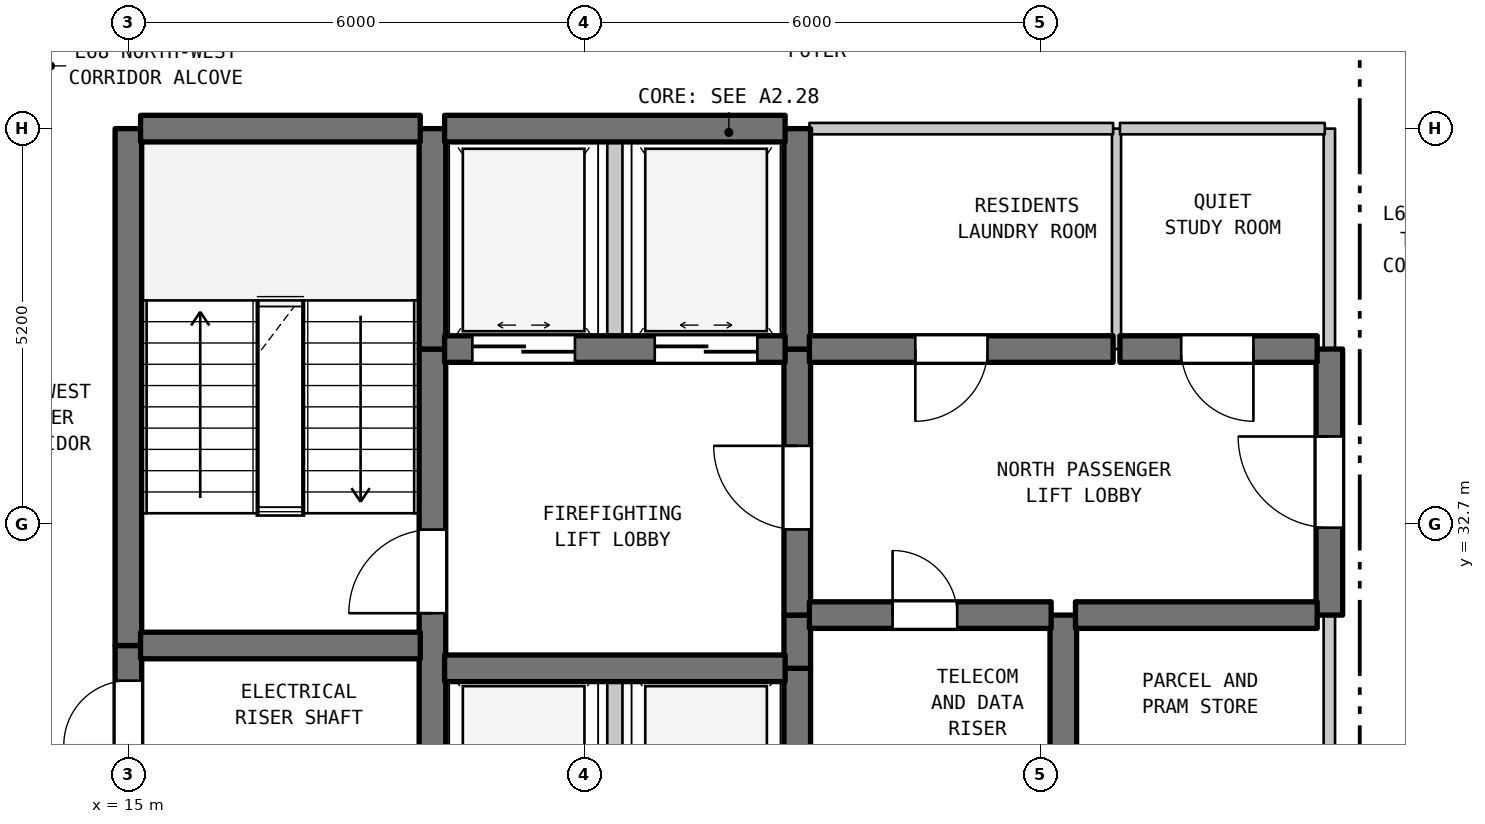
"""IFC4 building model, lengths in metres.
Left out: names, types, materials, properties, quantities, classifications, styles, units other than length and angle.
Written with IfcOpenShell. Run it as: python <this file> out.ifc"""

import sys

from ifc_helpers import new_model, si_unit, direction, frame, frame_2d, origin, place, context, subcontext, project, spatial, rectangle, extrude, element, fill, save


model = new_model("IFC4")
c1 = context("Model", 3, precision=1e-05, world=origin(), true_north=direction((0.0, 1.0)))
c2 = subcontext(c1, "Body", "Model", "MODEL_VIEW")
j1 = project(units=[si_unit("LENGTHUNIT", "METRE"), si_unit("PLANEANGLEUNIT", "RADIAN")], contexts=[c1])
p1 = place(None, origin())
s1 = spatial("IfcSite", under=j1, at=p1, CompositionType="ELEMENT")
p2 = place(p1, origin())
s2 = spatial("IfcBuilding", under=s1, at=p2, CompositionType="ELEMENT")
p3 = place(p2, frame((0.0, 0.0, 273.2)))
s3 = spatial("IfcBuildingStorey", under=s2, at=p3, CompositionType="ELEMENT", Elevation=273.2)
p4 = place(p3, frame((15.0, 29.5, 0.0), z_axis=(0.0, 0.0, 1.0), x_axis=(0.0, 1.0, 0.0)))
e1 = element("IfcWall", 1, at=p4, inside=s3, PredefinedType="SHEAR", context=c2, shape_type="SweptSolid", body=[
    extrude(rectangle(XDim=1.6, YDim=0.35, at=frame_2d((0.8, 0.0))), origin(), (0.0, 0.0, 1.0), 3.39),
])
p5 = place(p4, frame((0.287, 0.0, 0.0)))
e2 = element("IfcOpeningElement", 2, at=p5, cuts=e1, PredefinedType="OPENING", context=c2, shape_type="SweptSolid", body=[
    extrude(rectangle(XDim=0.85, YDim=2.1, at=frame_2d((0.425, 1.05))), frame((0.0, 0.185, 0.0), z_axis=(0.0, -1.0, 0.0), x_axis=(1.0, 0.0, 0.0)), (0.0, 0.0, 1.0), 0.37),
])
p6 = place(p3, frame((15.0, 31.1, 0.0), z_axis=(0.0, 0.0, 1.0), x_axis=(0.0, 1.0, 0.0)))
e3 = element("IfcWall", 3, at=p6, inside=s3, PredefinedType="SHEAR", context=c2, shape_type="SweptSolid", body=[
    extrude(rectangle(XDim=6.8, YDim=0.35, at=frame_2d((3.4, 0.0))), origin(), (0.0, 0.0, 1.0), 3.39),
])
p7 = place(p3, frame((19.0, 29.5, 0.0), z_axis=(0.0, 0.0, 1.0), x_axis=(0.0, 1.0, 0.0)))
e4 = element("IfcWall", 4, at=p7, inside=s3, PredefinedType="SHEAR", context=c2, shape_type="SweptSolid", body=[
    extrude(rectangle(XDim=5.5, YDim=0.35, at=frame_2d((2.75, 0.0))), origin(), (0.0, 0.0, 1.0), 3.39),
])
p8 = place(p7, frame((2.025, 0.0, 0.0)))
e5 = element("IfcOpeningElement", 5, at=p8, cuts=e4, PredefinedType="OPENING", context=c2, shape_type="SweptSolid", body=[
    extrude(rectangle(XDim=1.1, YDim=2.15, at=frame_2d((0.55, 1.075))), frame((0.0, 0.185, 0.0), z_axis=(0.0, -1.0, 0.0), x_axis=(1.0, 0.0, 0.0)), (0.0, 0.0, 1.0), 0.37),
])
p9 = place(p3, frame((19.0, 35.0, 0.0), z_axis=(0.0, 0.0, 1.0), x_axis=(0.0, 1.0, 0.0)))
e6 = element("IfcWall", 6, at=p9, inside=s3, PredefinedType="SHEAR", context=c2, shape_type="SweptSolid", body=[
    extrude(rectangle(XDim=2.9, YDim=0.35, at=frame_2d((1.45, 0.0))), origin(), (0.0, 0.0, 1.0), 3.39),
])
p10 = place(p3, frame((21.4, 28.2, 0.0), z_axis=(0.0, 0.0, 1.0), x_axis=(0.0, 1.0, 0.0)))
e7 = element("IfcWall", 7, at=p10, inside=s3, PredefinedType="STANDARD", context=c2, shape_type="SweptSolid", body=[
    extrude(rectangle(XDim=2.6, YDim=0.2, at=frame_2d((1.3, 0.0))), origin(), (0.0, 0.0, 1.0), 3.39),
])
p11 = place(p3, frame((21.4, 35.0, 0.0), z_axis=(0.0, 0.0, 1.0), x_axis=(0.0, 1.0, 0.0)))
e8 = element("IfcWall", 8, at=p11, inside=s3, PredefinedType="STANDARD", context=c2, shape_type="SweptSolid", body=[
    extrude(rectangle(XDim=2.9, YDim=0.2, at=frame_2d((1.45, 0.0))), origin(), (0.0, 0.0, 1.0), 3.39),
])
p12 = place(p3, frame((23.8, 28.2, 0.0), z_axis=(0.0, 0.0, 1.0), x_axis=(0.0, 1.0, 0.0)))
e9 = element("IfcWall", 9, at=p12, inside=s3, PredefinedType="SHEAR", context=c2, shape_type="SweptSolid", body=[
    extrude(rectangle(XDim=2.6, YDim=0.35, at=frame_2d((1.3, 0.0))), origin(), (0.0, 0.0, 1.0), 3.39),
])
p13 = place(p3, frame((23.8, 30.8, 0.0), z_axis=(0.0, 0.0, 1.0), x_axis=(0.0, 1.0, 0.0)))
e10 = element("IfcWall", 10, at=p13, inside=s3, PredefinedType="SHEAR", context=c2, shape_type="SweptSolid", body=[
    extrude(rectangle(XDim=0.7, YDim=0.35, at=frame_2d((0.35, 0.0))), origin(), (0.0, 0.0, 1.0), 3.39),
])
p14 = place(p3, frame((23.8, 31.5, 0.0), z_axis=(0.0, 0.0, 1.0), x_axis=(0.0, 1.0, 0.0)))
e11 = element("IfcWall", 11, at=p14, inside=s3, PredefinedType="SHEAR", context=c2, shape_type="SweptSolid", body=[
    extrude(rectangle(XDim=3.5, YDim=0.35, at=frame_2d((1.75, 0.0))), origin(), (0.0, 0.0, 1.0), 3.39),
])
p15 = place(p14, frame((1.127, 0.0, 0.0)))
e12 = element("IfcOpeningElement", 12, at=p15, cuts=e11, PredefinedType="OPENING", context=c2, shape_type="SweptSolid", body=[
    extrude(rectangle(XDim=1.1, YDim=2.15, at=frame_2d((0.55, 1.075))), frame((0.0, 0.185, 0.0), z_axis=(0.0, -1.0, 0.0), x_axis=(1.0, 0.0, 0.0)), (0.0, 0.0, 1.0), 0.37),
])
p16 = place(p3, frame((23.8, 35.0, 0.0), z_axis=(0.0, 0.0, 1.0), x_axis=(0.0, 1.0, 0.0)))
e13 = element("IfcWall", 13, at=p16, inside=s3, PredefinedType="SHEAR", context=c2, shape_type="SweptSolid", body=[
    extrude(rectangle(XDim=2.9, YDim=0.35, at=frame_2d((1.45, 0.0))), origin(), (0.0, 0.0, 1.0), 3.39),
])
p17 = place(p3, frame((27.3, 28.9, 0.0), z_axis=(0.0, 0.0, 1.0), x_axis=(0.0, 1.0, 0.0)))
e14 = element("IfcWall", 14, at=p17, inside=s3, PredefinedType="SHEAR", context=c2, shape_type="SweptSolid", body=[
    extrude(rectangle(XDim=2.6, YDim=0.35, at=frame_2d((1.3, 0.0))), origin(), (0.0, 0.0, 1.0), 3.39),
])
p18 = place(p3, frame((28.0, 35.0, 0.0), z_axis=(0.0, 0.0, 1.0), x_axis=(0.0, 1.0, 0.0)))
e15 = element("IfcWall", 15, at=p18, inside=s3, PredefinedType="PARTITIONING", context=c2, shape_type="SweptSolid", body=[
    extrude(rectangle(XDim=2.9, YDim=0.12, at=frame_2d((1.45, 0.0))), origin(), (0.0, 0.0, 1.0), 3.39),
])
p19 = place(p3, frame((30.8, 28.9, 0.0), z_axis=(0.0, 0.0, 1.0), x_axis=(0.0, 1.0, 0.0)))
e16 = element("IfcWall", 16, at=p19, inside=s3, PredefinedType="STANDARD", context=c2, shape_type="SweptSolid", body=[
    extrude(rectangle(XDim=2.6, YDim=0.15, at=frame_2d((1.3, 0.0))), origin(), (0.0, 0.0, 1.0), 3.39),
])
p20 = place(p3, frame((30.8, 31.5, 0.0), z_axis=(0.0, 0.0, 1.0), x_axis=(0.0, 1.0, 0.0)))
e17 = element("IfcWall", 17, at=p20, inside=s3, PredefinedType="SHEAR", context=c2, shape_type="SweptSolid", body=[
    extrude(rectangle(XDim=3.5, YDim=0.35, at=frame_2d((1.75, 0.0))), origin(), (0.0, 0.0, 1.0), 3.39),
])
p21 = place(p20, frame((1.15, 0.0, 0.0)))
e18 = element("IfcOpeningElement", 18, at=p21, cuts=e17, PredefinedType="OPENING", context=c2, shape_type="SweptSolid", body=[
    extrude(rectangle(XDim=1.2, YDim=2.2, at=frame_2d((0.6, 1.1))), frame((0.0, 0.185, 0.0), z_axis=(0.0, -1.0, 0.0), x_axis=(1.0, 0.0, 0.0)), (0.0, 0.0, 1.0), 0.37),
])
p22 = place(p3, frame((30.8, 35.0, 0.0), z_axis=(0.0, 0.0, 1.0), x_axis=(0.0, 1.0, 0.0)))
e19 = element("IfcWall", 19, at=p22, inside=s3, PredefinedType="STANDARD", context=c2, shape_type="SweptSolid", body=[
    extrude(rectangle(XDim=2.9, YDim=0.15, at=frame_2d((1.45, 0.0))), origin(), (0.0, 0.0, 1.0), 3.39),
])
p23 = place(p3, frame((19.16, 30.8, 0.0), z_axis=(0.0, 0.0, 1.0), x_axis=(1.0, 0.0, 0.0)))
e20 = element("IfcWall", 20, at=p23, inside=s3, PredefinedType="SHEAR", context=c2, shape_type="SweptSolid", body=[
    extrude(rectangle(XDim=4.48, YDim=0.35, at=frame_2d((2.24, 0.0))), origin(), (0.0, 0.0, 1.0), 3.39),
])
p24 = place(p3, frame((15.16, 31.1, 0.0), z_axis=(0.0, 0.0, 1.0), x_axis=(1.0, 0.0, 0.0)))
e21 = element("IfcWall", 21, at=p24, inside=s3, PredefinedType="SHEAR", context=c2, shape_type="SweptSolid", body=[
    extrude(rectangle(XDim=3.68, YDim=0.35, at=frame_2d((1.84, 0.0))), origin(), (0.0, 0.0, 1.0), 3.39),
])
p25 = place(p3, frame((23.96, 31.5, 0.0), z_axis=(0.0, 0.0, 1.0), x_axis=(1.0, 0.0, 0.0)))
e22 = element("IfcWall", 22, at=p25, inside=s3, PredefinedType="SHEAR", context=c2, shape_type="SweptSolid", body=[
    extrude(rectangle(XDim=3.18, YDim=0.35, at=frame_2d((1.59, 0.0))), origin(), (0.0, 0.0, 1.0), 3.39),
])
p26 = place(p25, frame((1.094, 0.0, 0.0)))
e23 = element("IfcOpeningElement", 23, at=p26, cuts=e22, PredefinedType="OPENING", context=c2, shape_type="SweptSolid", body=[
    extrude(rectangle(XDim=0.85, YDim=2.1, at=frame_2d((0.425, 1.05))), frame((0.0, 0.185, 0.0), z_axis=(0.0, -1.0, 0.0), x_axis=(1.0, 0.0, 0.0)), (0.0, 0.0, 1.0), 0.37),
])
p27 = place(p3, frame((27.46, 31.5, 0.0), z_axis=(0.0, 0.0, 1.0), x_axis=(1.0, 0.0, 0.0)))
e24 = element("IfcWall", 24, at=p27, inside=s3, PredefinedType="SHEAR", context=c2, shape_type="SweptSolid", body=[
    extrude(rectangle(XDim=3.18, YDim=0.35, at=frame_2d((1.59, 0.0))), origin(), (0.0, 0.0, 1.0), 3.39),
])
p28 = place(p3, frame((19.16, 35.0, 0.0), z_axis=(0.0, 0.0, 1.0), x_axis=(1.0, 0.0, 0.0)))
e25 = element("IfcWall", 25, at=p28, inside=s3, PredefinedType="SHEAR", context=c2, shape_type="SweptSolid", body=[
    extrude(rectangle(XDim=4.48, YDim=0.35, at=frame_2d((2.24, 0.0))), origin(), (0.0, 0.0, 1.0), 3.39),
])
p29 = place(p28, frame((0.365, 0.0, 0.0)))
e26 = element("IfcOpeningElement", 26, at=p29, cuts=e25, PredefinedType="OPENING", context=c2, shape_type="SweptSolid", body=[
    extrude(rectangle(XDim=1.35, YDim=2.2, at=frame_2d((0.675, 1.1))), frame((0.0, 0.185, 0.0), z_axis=(0.0, -1.0, 0.0), x_axis=(1.0, 0.0, 0.0)), (0.0, 0.0, 1.0), 0.37),
])
p30 = place(p28, frame((2.765, 0.0, 0.0)))
e27 = element("IfcOpeningElement", 27, at=p30, cuts=e25, PredefinedType="OPENING", context=c2, shape_type="SweptSolid", body=[
    extrude(rectangle(XDim=1.35, YDim=2.2, at=frame_2d((0.675, 1.1))), frame((0.0, 0.185, 0.0), z_axis=(0.0, -1.0, 0.0), x_axis=(1.0, 0.0, 0.0)), (0.0, 0.0, 1.0), 0.37),
])
p31 = place(p3, frame((23.96, 35.0, 0.0), z_axis=(0.0, 0.0, 1.0), x_axis=(1.0, 0.0, 0.0)))
e28 = element("IfcWall", 28, at=p31, inside=s3, PredefinedType="SHEAR", context=c2, shape_type="SweptSolid", body=[
    extrude(rectangle(XDim=3.995, YDim=0.35, at=frame_2d((1.998, 0.0))), origin(), (0.0, 0.0, 1.0), 3.39),
])
p32 = place(p31, frame((1.393, 0.0, 0.0)))
e29 = element("IfcOpeningElement", 29, at=p32, cuts=e28, PredefinedType="OPENING", context=c2, shape_type="SweptSolid", body=[
    extrude(rectangle(XDim=0.95, YDim=2.15, at=frame_2d((0.475, 1.075))), frame((0.0, 0.185, 0.0), z_axis=(0.0, -1.0, 0.0), x_axis=(1.0, 0.0, 0.0)), (0.0, 0.0, 1.0), 0.37),
])
p33 = place(p3, frame((28.045, 35.0, 0.0), z_axis=(0.0, 0.0, 1.0), x_axis=(1.0, 0.0, 0.0)))
e30 = element("IfcWall", 30, at=p33, inside=s3, PredefinedType="SHEAR", context=c2, shape_type="SweptSolid", body=[
    extrude(rectangle(XDim=2.595, YDim=0.35, at=frame_2d((1.297, 0.0))), origin(), (0.0, 0.0, 1.0), 3.39),
])
p34 = place(p33, frame((0.806, 0.0, 0.0)))
e31 = element("IfcOpeningElement", 31, at=p34, cuts=e30, PredefinedType="OPENING", context=c2, shape_type="SweptSolid", body=[
    extrude(rectangle(XDim=0.95, YDim=2.15, at=frame_2d((0.475, 1.075))), frame((0.0, 0.185, 0.0), z_axis=(0.0, -1.0, 0.0), x_axis=(1.0, 0.0, 0.0)), (0.0, 0.0, 1.0), 0.37),
])
p35 = place(p3, frame((15.16, 37.9, 0.0), z_axis=(0.0, 0.0, 1.0), x_axis=(1.0, 0.0, 0.0)))
e32 = element("IfcWall", 32, at=p35, inside=s3, PredefinedType="SHEAR", context=c2, shape_type="SweptSolid", body=[
    extrude(rectangle(XDim=3.68, YDim=0.35, at=frame_2d((1.84, 0.0))), origin(), (0.0, 0.0, 1.0), 3.39),
])
p36 = place(p3, frame((19.16, 37.9, 0.0), z_axis=(0.0, 0.0, 1.0), x_axis=(1.0, 0.0, 0.0)))
e33 = element("IfcWall", 33, at=p36, inside=s3, PredefinedType="SHEAR", context=c2, shape_type="SweptSolid", body=[
    extrude(rectangle(XDim=4.48, YDim=0.35, at=frame_2d((2.24, 0.0))), origin(), (0.0, 0.0, 1.0), 3.39),
])
p37 = place(p3, frame((23.96, 37.9, 0.0), z_axis=(0.0, 0.0, 1.0), x_axis=(1.0, 0.0, 0.0)))
e34 = element("IfcWall", 34, at=p37, inside=s3, PredefinedType="STANDARD", context=c2, shape_type="SweptSolid", body=[
    extrude(rectangle(XDim=3.995, YDim=0.15, at=frame_2d((1.998, 0.0))), origin(), (0.0, 0.0, 1.0), 2.89),
])
p38 = place(p3, frame((28.045, 37.9, 0.0), z_axis=(0.0, 0.0, 1.0), x_axis=(1.0, 0.0, 0.0)))
e35 = element("IfcWall", 35, at=p38, inside=s3, PredefinedType="STANDARD", context=c2, shape_type="SweptSolid", body=[
    extrude(rectangle(XDim=2.695, YDim=0.15, at=frame_2d((1.348, 0.0))), origin(), (0.0, 0.0, 1.0), 2.89),
])
p39 = place(p5, origin())
e36 = element("IfcDoor", 36, at=p39, inside=s3, OperationType="SINGLE_SWING_LEFT", PredefinedType="DOOR", context=c2, shape_type="SweptSolid", body=[
    extrude(rectangle(XDim=0.85, YDim=2.1, at=frame_2d((0.425, 1.05))), frame((0.0, 0.025, 0.0), z_axis=(0.0, -1.0, 0.0), x_axis=(1.0, 0.0, 0.0)), (0.0, 0.0, 1.0), 0.05),
])
fill(e2, e36)
p40 = place(p8, origin())
e37 = element("IfcDoor", 37, at=p40, inside=s3, OperationType="SINGLE_SWING_LEFT", PredefinedType="DOOR", context=c2, shape_type="SweptSolid", body=[
    extrude(rectangle(XDim=1.1, YDim=2.15, at=frame_2d((0.55, 1.075))), frame((0.0, 0.025, 0.0), z_axis=(0.0, -1.0, 0.0), x_axis=(1.0, 0.0, 0.0)), (0.0, 0.0, 1.0), 0.05),
])
fill(e5, e37)
p41 = place(p15, origin())
e38 = element("IfcDoor", 38, at=p41, inside=s3, OperationType="SINGLE_SWING_RIGHT", PredefinedType="DOOR", context=c2, shape_type="SweptSolid", body=[
    extrude(rectangle(XDim=1.1, YDim=2.15, at=frame_2d((0.55, 1.075))), frame((0.0, 0.025, 0.0), z_axis=(0.0, -1.0, 0.0), x_axis=(1.0, 0.0, 0.0)), (0.0, 0.0, 1.0), 0.05),
])
fill(e12, e38)
p42 = place(p21, origin())
e39 = element("IfcDoor", 39, at=p42, inside=s3, OperationType="SINGLE_SWING_RIGHT", PredefinedType="DOOR", context=c2, shape_type="SweptSolid", body=[
    extrude(rectangle(XDim=1.2, YDim=2.2, at=frame_2d((0.6, 1.1))), frame((0.0, 0.025, 0.0), z_axis=(0.0, -1.0, 0.0), x_axis=(1.0, 0.0, 0.0)), (0.0, 0.0, 1.0), 0.05),
])
fill(e18, e39)
p43 = place(p26, origin())
e40 = element("IfcDoor", 40, at=p43, inside=s3, OperationType="SINGLE_SWING_LEFT", PredefinedType="DOOR", context=c2, shape_type="SweptSolid", body=[
    extrude(rectangle(XDim=0.85, YDim=2.1, at=frame_2d((0.425, 1.05))), frame((0.0, 0.025, 0.0), z_axis=(0.0, -1.0, 0.0), x_axis=(1.0, 0.0, 0.0)), (0.0, 0.0, 1.0), 0.05),
])
fill(e23, e40)
p44 = place(p29, origin())
e41 = element("IfcDoor", 41, at=p44, inside=s3, OperationType="DOUBLE_DOOR_SLIDING", PredefinedType="DOOR", context=c2, shape_type="SweptSolid", body=[
    extrude(rectangle(XDim=1.35, YDim=2.2, at=frame_2d((0.675, 1.1))), frame((0.0, 0.025, 0.0), z_axis=(0.0, -1.0, 0.0), x_axis=(1.0, 0.0, 0.0)), (0.0, 0.0, 1.0), 0.05),
])
fill(e26, e41)
p45 = place(p30, origin())
e42 = element("IfcDoor", 42, at=p45, inside=s3, OperationType="DOUBLE_DOOR_SLIDING", PredefinedType="DOOR", context=c2, shape_type="SweptSolid", body=[
    extrude(rectangle(XDim=1.35, YDim=2.2, at=frame_2d((0.675, 1.1))), frame((0.0, 0.025, 0.0), z_axis=(0.0, -1.0, 0.0), x_axis=(1.0, 0.0, 0.0)), (0.0, 0.0, 1.0), 0.05),
])
fill(e27, e42)
p46 = place(p32, frame((0.95, 0.0, 0.0), z_axis=(0.0, 0.0, 1.0), x_axis=(-1.0, 0.0, 0.0)))
e43 = element("IfcDoor", 43, at=p46, inside=s3, OperationType="SINGLE_SWING_LEFT", PredefinedType="DOOR", context=c2, shape_type="SweptSolid", body=[
    extrude(rectangle(XDim=0.95, YDim=2.15, at=frame_2d((0.475, 1.075))), frame((0.0, 0.025, 0.0), z_axis=(0.0, -1.0, 0.0), x_axis=(1.0, 0.0, 0.0)), (0.0, 0.0, 1.0), 0.05),
])
fill(e29, e43)
p47 = place(p34, frame((0.95, 0.0, 0.0), z_axis=(0.0, 0.0, 1.0), x_axis=(-1.0, 0.0, 0.0)))
e44 = element("IfcDoor", 44, at=p47, inside=s3, OperationType="SINGLE_SWING_RIGHT", PredefinedType="DOOR", context=c2, shape_type="SweptSolid", body=[
    extrude(rectangle(XDim=0.95, YDim=2.15, at=frame_2d((0.475, 1.075))), frame((0.0, 0.025, 0.0), z_axis=(0.0, -1.0, 0.0), x_axis=(1.0, 0.0, 0.0)), (0.0, 0.0, 1.0), 0.05),
])
fill(e31, e44)
save(model, sys.argv[1])
